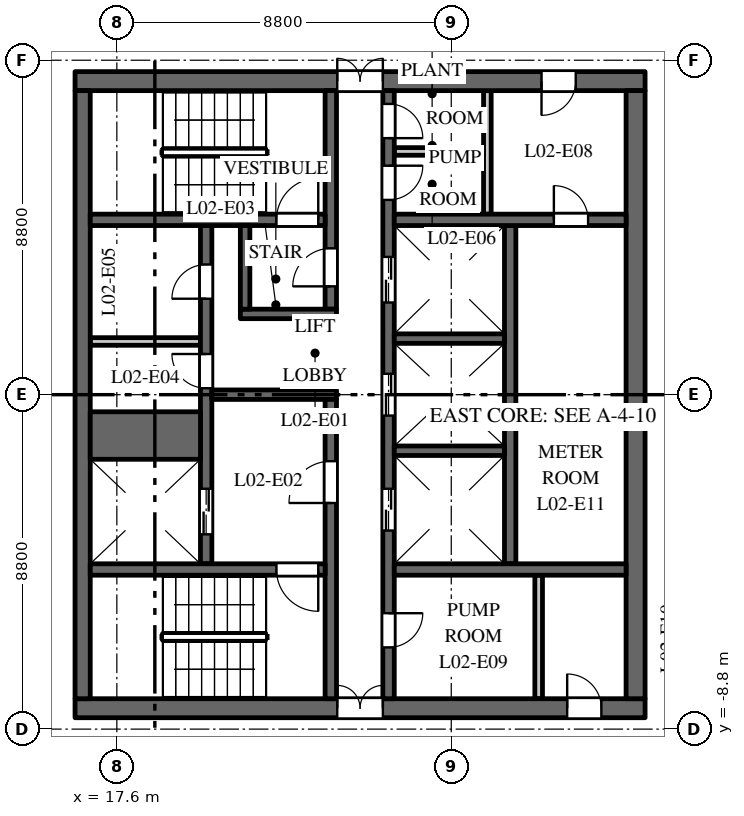
"""IFC4 building model, lengths in metres.
Left out: names, types, materials, properties, quantities, classifications, styles, units other than length and angle.
Written with IfcOpenShell. Run it as: python <this file> out.ifc"""

import sys

from ifc_helpers import new_model, si_unit, direction, frame, frame_2d, origin, place, context, subcontext, project, spatial, rectangle, extrude, element, fill, save


model = new_model("IFC4")
c1 = context("Model", 3, precision=1e-05, world=origin(), true_north=direction((0.0, 1.0)))
c2 = subcontext(c1, "Body", "Model", "MODEL_VIEW")
j1 = project(units=[si_unit("LENGTHUNIT", "METRE"), si_unit("PLANEANGLEUNIT", "RADIAN")], contexts=[c1])
p1 = place(None, origin())
s1 = spatial("IfcSite", under=j1, at=p1, CompositionType="ELEMENT")
p2 = place(p1, origin())
s2 = spatial("IfcBuilding", under=s1, at=p2, CompositionType="ELEMENT")
p3 = place(p2, frame((0.0, 0.0, 13.5)))
s3 = spatial("IfcBuildingStorey", under=s2, at=p3, CompositionType="ELEMENT", Elevation=13.5)
p4 = place(p3, frame((16.5, 8.25, 0.0), z_axis=(0.0, 0.0, 1.0), x_axis=(1.0, 0.0, 0.0)))
e1 = element("IfcWall", 1, at=p4, inside=s3, PredefinedType="SHEAR", context=c2, shape_type="SweptSolid", body=[
    extrude(rectangle(XDim=15.0, YDim=0.5, at=frame_2d((7.5, 0.0))), origin(), (0.0, 0.0, 1.0), 5.75),
])
p5 = place(p4, frame((6.9, 0.0, 0.0)))
e2 = element("IfcOpeningElement", 2, at=p5, cuts=e1, PredefinedType="OPENING", context=c2, shape_type="SweptSolid", body=[
    extrude(rectangle(XDim=1.2, YDim=2.1, at=frame_2d((0.6, 1.05))), frame((0.0, 0.26, 0.0), z_axis=(0.0, -1.0, 0.0), x_axis=(1.0, 0.0, 0.0)), (0.0, 0.0, 1.0), 0.52),
])
p6 = place(p4, frame((12.275, 0.0, 0.0)))
e3 = element("IfcOpeningElement", 3, at=p6, cuts=e1, PredefinedType="OPENING", context=c2, shape_type="SweptSolid", body=[
    extrude(rectangle(XDim=0.9, YDim=2.1, at=frame_2d((0.45, 1.05))), frame((0.0, 0.26, 0.0), z_axis=(0.0, -1.0, 0.0), x_axis=(1.0, 0.0, 0.0)), (0.0, 0.0, 1.0), 0.52),
])
p7 = place(p3, frame((16.5, -8.25, 0.0), z_axis=(0.0, 0.0, 1.0), x_axis=(1.0, 0.0, 0.0)))
e4 = element("IfcWall", 4, at=p7, inside=s3, PredefinedType="SHEAR", context=c2, shape_type="SweptSolid", body=[
    extrude(rectangle(XDim=15.0, YDim=0.5, at=frame_2d((7.5, 0.0))), origin(), (0.0, 0.0, 1.0), 5.75),
])
p8 = place(p7, frame((6.9, 0.0, 0.0)))
e5 = element("IfcOpeningElement", 5, at=p8, cuts=e4, PredefinedType="OPENING", context=c2, shape_type="SweptSolid", body=[
    extrude(rectangle(XDim=1.2, YDim=2.1, at=frame_2d((0.6, 1.05))), frame((0.0, 0.26, 0.0), z_axis=(0.0, -1.0, 0.0), x_axis=(1.0, 0.0, 0.0)), (0.0, 0.0, 1.0), 0.52),
])
p9 = place(p7, frame((12.95, 0.0, 0.0)))
e6 = element("IfcOpeningElement", 6, at=p9, cuts=e4, PredefinedType="OPENING", context=c2, shape_type="SweptSolid", body=[
    extrude(rectangle(XDim=0.9, YDim=2.1, at=frame_2d((0.45, 1.05))), frame((0.0, 0.26, 0.0), z_axis=(0.0, -1.0, 0.0), x_axis=(1.0, 0.0, 0.0)), (0.0, 0.0, 1.0), 0.52),
])
p10 = place(p3, frame((16.9, 1.4, 0.0), z_axis=(0.0, 0.0, 1.0), x_axis=(1.0, 0.0, 0.0)))
e7 = element("IfcWall", 7, at=p10, inside=s3, PredefinedType="PARTITIONING", context=c2, shape_type="SweptSolid", body=[
    extrude(rectangle(XDim=2.9, YDim=0.2, at=frame_2d((1.45, 0.0))), origin(), (0.0, 0.0, 1.0), 5.75),
])
p11 = place(p3, frame((27.95, -4.45, 0.0), z_axis=(0.0, 0.0, 1.0), x_axis=(0.0, 1.0, 0.0)))
e8 = element("IfcWall", 8, at=p11, inside=s3, PredefinedType="SHEAR", context=c2, shape_type="SweptSolid", body=[
    extrude(rectangle(XDim=8.9, YDim=0.3, at=frame_2d((4.45, 0.0))), origin(), (0.0, 0.0, 1.0), 5.75),
])
p12 = place(p3, frame((19.95, -4.45, 0.0), z_axis=(0.0, 0.0, 1.0), x_axis=(0.0, 1.0, 0.0)))
e9 = element("IfcWall", 9, at=p12, inside=s3, PredefinedType="SHEAR", context=c2, shape_type="SweptSolid", body=[
    extrude(rectangle(XDim=8.9, YDim=0.3, at=frame_2d((4.45, 0.0))), origin(), (0.0, 0.0, 1.0), 5.75),
])
p13 = place(p12, frame((0.775, 0.0, 0.0)))
e10 = element("IfcOpeningElement", 10, at=p13, cuts=e9, PredefinedType="OPENING", context=c2, shape_type="SweptSolid", body=[
    extrude(rectangle(XDim=1.2, YDim=2.1, at=frame_2d((0.6, 1.05))), frame((0.0, 0.16, 0.0), z_axis=(0.0, -1.0, 0.0), x_axis=(1.0, 0.0, 0.0)), (0.0, 0.0, 1.0), 0.32),
])
p14 = place(p12, frame((4.62, 0.0, 0.0)))
e11 = element("IfcOpeningElement", 11, at=p14, cuts=e9, PredefinedType="OPENING", context=c2, shape_type="SweptSolid", body=[
    extrude(rectangle(XDim=0.9, YDim=2.1, at=frame_2d((0.45, 1.05))), frame((0.0, 0.16, 0.0), z_axis=(0.0, -1.0, 0.0), x_axis=(1.0, 0.0, 0.0)), (0.0, 0.0, 1.0), 0.32),
])
p15 = place(p12, frame((6.975, 0.0, 0.0)))
e12 = element("IfcOpeningElement", 12, at=p15, cuts=e9, PredefinedType="OPENING", context=c2, shape_type="SweptSolid", body=[
    extrude(rectangle(XDim=0.9, YDim=2.1, at=frame_2d((0.45, 1.05))), frame((0.0, 0.16, 0.0), z_axis=(0.0, -1.0, 0.0), x_axis=(1.0, 0.0, 0.0)), (0.0, 0.0, 1.0), 0.32),
])
p16 = place(p3, frame((24.75, -8.0, 0.0), z_axis=(0.0, 0.0, 1.0), x_axis=(0.0, 1.0, 0.0)))
e13 = element("IfcWall", 13, at=p16, inside=s3, PredefinedType="SHEAR", context=c2, shape_type="SweptSolid", body=[
    extrude(rectangle(XDim=16.0, YDim=0.3, at=frame_2d((8.0, 0.0))), origin(), (0.0, 0.0, 1.0), 5.75),
])
p17 = place(p16, frame((4.425, 0.0, 0.0)))
e14 = element("IfcOpeningElement", 14, at=p17, cuts=e13, PredefinedType="OPENING", context=c2, shape_type="SweptSolid", body=[
    extrude(rectangle(XDim=1.1, YDim=2.1, at=frame_2d((0.55, 1.05))), frame((0.0, 0.16, 0.0), z_axis=(0.0, -1.0, 0.0), x_axis=(1.0, 0.0, 0.0)), (0.0, 0.0, 1.0), 0.32),
])
p18 = place(p16, frame((7.45, 0.0, 0.0)))
e15 = element("IfcOpeningElement", 15, at=p18, cuts=e13, PredefinedType="OPENING", context=c2, shape_type="SweptSolid", body=[
    extrude(rectangle(XDim=1.1, YDim=2.1, at=frame_2d((0.55, 1.05))), frame((0.0, 0.16, 0.0), z_axis=(0.0, -1.0, 0.0), x_axis=(1.0, 0.0, 0.0)), (0.0, 0.0, 1.0), 0.32),
])
p19 = place(p16, frame((10.425, 0.0, 0.0)))
e16 = element("IfcOpeningElement", 16, at=p19, cuts=e13, PredefinedType="OPENING", context=c2, shape_type="SweptSolid", body=[
    extrude(rectangle(XDim=1.2, YDim=2.1, at=frame_2d((0.6, 1.05))), frame((0.0, 0.16, 0.0), z_axis=(0.0, -1.0, 0.0), x_axis=(1.0, 0.0, 0.0)), (0.0, 0.0, 1.0), 0.32),
])
p20 = place(p16, frame((13.125, 0.0, 0.0)))
e17 = element("IfcOpeningElement", 17, at=p20, cuts=e13, PredefinedType="OPENING", context=c2, shape_type="SweptSolid", body=[
    extrude(rectangle(XDim=0.9, YDim=2.1, at=frame_2d((0.45, 1.05))), frame((0.0, 0.16, 0.0), z_axis=(0.0, -1.0, 0.0), x_axis=(1.0, 0.0, 0.0)), (0.0, 0.0, 1.0), 0.32),
])
p21 = place(p16, frame((14.75, 0.0, 0.0)))
e18 = element("IfcOpeningElement", 18, at=p21, cuts=e13, PredefinedType="OPENING", context=c2, shape_type="SweptSolid", body=[
    extrude(rectangle(XDim=0.9, YDim=2.1, at=frame_2d((0.45, 1.05))), frame((0.0, 0.16, 0.0), z_axis=(0.0, -1.0, 0.0), x_axis=(1.0, 0.0, 0.0)), (0.0, 0.0, 1.0), 0.32),
])
p22 = place(p16, frame((1.35, 0.0, 0.0)))
e19 = element("IfcOpeningElement", 19, at=p22, cuts=e13, PredefinedType="OPENING", context=c2, shape_type="SweptSolid", body=[
    extrude(rectangle(XDim=0.9, YDim=2.1, at=frame_2d((0.45, 1.05))), frame((0.0, 0.16, 0.0), z_axis=(0.0, -1.0, 0.0), x_axis=(1.0, 0.0, 0.0)), (0.0, 0.0, 1.0), 0.32),
])
p23 = place(p3, frame((20.1, 0.0, 0.0), z_axis=(0.0, 0.0, 1.0), x_axis=(1.0, 0.0, 0.0)))
e20 = element("IfcWall", 20, at=p23, inside=s3, PredefinedType="SHEAR", context=c2, shape_type="SweptSolid", body=[
    extrude(rectangle(XDim=3.28, YDim=0.25, at=frame_2d((1.64, 0.0))), origin(), (0.0, 0.0, 1.0), 5.75),
])
p24 = place(p3, frame((16.7, -8.0, 0.0), z_axis=(0.0, 0.0, 1.0), x_axis=(0.0, 1.0, 0.0)))
e21 = element("IfcWall", 21, at=p24, inside=s3, PredefinedType="SHEAR", context=c2, shape_type="SweptSolid", body=[
    extrude(rectangle(XDim=16.0, YDim=0.4, at=frame_2d((8.0, 0.0))), origin(), (0.0, 0.0, 1.0), 5.75),
])
p25 = place(p3, frame((31.25, -8.0, 0.0), z_axis=(0.0, 0.0, 1.0), x_axis=(0.0, 1.0, 0.0)))
e22 = element("IfcWall", 22, at=p25, inside=s3, PredefinedType="SHEAR", context=c2, shape_type="SweptSolid", body=[
    extrude(rectangle(XDim=16.0, YDim=0.5, at=frame_2d((8.0, 0.0))), origin(), (0.0, 0.0, 1.0), 5.75),
])
p26 = place(p3, frame((24.9, 4.6, 0.0), z_axis=(0.0, 0.0, 1.0), x_axis=(1.0, 0.0, 0.0)))
e23 = element("IfcWall", 23, at=p26, inside=s3, PredefinedType="SHEAR", context=c2, shape_type="SweptSolid", body=[
    extrude(rectangle(XDim=6.1, YDim=0.3, at=frame_2d((3.05, 0.0))), origin(), (0.0, 0.0, 1.0), 5.75),
])
p27 = place(p26, frame((4.2, 0.0, 0.0)))
e24 = element("IfcOpeningElement", 24, at=p27, cuts=e23, PredefinedType="OPENING", context=c2, shape_type="SweptSolid", body=[
    extrude(rectangle(XDim=0.9, YDim=2.1, at=frame_2d((0.45, 1.05))), frame((0.0, 0.16, 0.0), z_axis=(0.0, -1.0, 0.0), x_axis=(1.0, 0.0, 0.0)), (0.0, 0.0, 1.0), 0.32),
])
for number, where, z_axis, x_axis in (
    (25, (27.35, 4.75, 0.0), (0.0, 0.0, 1.0), (0.0, 1.0, 0.0)),
    (26, (28.7, -8.0, 0.0), (0.0, 0.0, 1.0), (0.0, 1.0, 0.0)),
):
    element("IfcWall", number, at=place(p3, frame(where, z_axis=z_axis, x_axis=x_axis)), inside=s3, PredefinedType="PARTITIONING", context=c2, shape_type="SweptSolid", body=[
        extrude(rectangle(XDim=3.25, YDim=0.2, at=frame_2d((1.625, 0.0))), origin(), (0.0, 0.0, 1.0), 5.75),
    ])
p28 = place(p3, frame((24.9, 6.4, 0.0), z_axis=(0.0, 0.0, 1.0), x_axis=(1.0, 0.0, 0.0)))
e27 = element("IfcWall", 27, at=p28, inside=s3, PredefinedType="PARTITIONING", context=c2, shape_type="SweptSolid", body=[
    extrude(rectangle(XDim=2.35, YDim=0.2, at=frame_2d((1.175, 0.0))), origin(), (0.0, 0.0, 1.0), 5.75),
])
p29 = place(p3, frame((24.9, -4.6, 0.0), z_axis=(0.0, 0.0, 1.0), x_axis=(1.0, 0.0, 0.0)))
e28 = element("IfcWall", 28, at=p29, inside=s3, PredefinedType="SHEAR", context=c2, shape_type="SweptSolid", body=[
    extrude(rectangle(XDim=6.1, YDim=0.3, at=frame_2d((3.05, 0.0))), origin(), (0.0, 0.0, 1.0), 5.75),
])
p30 = place(p3, frame((16.9, -1.075, 0.0), z_axis=(0.0, 0.0, 1.0), x_axis=(1.0, 0.0, 0.0)))
e29 = element("IfcWall", 29, at=p30, inside=s3, PredefinedType="SHEAR", context=c2, shape_type="SweptSolid", body=[
    extrude(rectangle(XDim=2.9, YDim=1.25, at=frame_2d((1.45, 0.0))), origin(), (0.0, 0.0, 1.0), 5.75),
])
for number, where, z_axis, x_axis in (
    (30, (24.9, -1.475, 0.0), (0.0, 0.0, 1.0), (1.0, 0.0, 0.0)),
    (31, (24.9, 1.475, 0.0), (0.0, 0.0, 1.0), (1.0, 0.0, 0.0)),
):
    element("IfcWall", number, at=place(p3, frame(where, z_axis=z_axis, x_axis=x_axis)), inside=s3, PredefinedType="SHEAR", context=c2, shape_type="SweptSolid", body=[
        extrude(rectangle(XDim=2.9, YDim=0.25, at=frame_2d((1.45, 0.0))), origin(), (0.0, 0.0, 1.0), 5.75),
    ])
p31 = place(p3, frame((23.23, 2.25, 0.0), z_axis=(0.0, 0.0, 1.0), x_axis=(0.0, 1.0, 0.0)))
e32 = element("IfcWall", 32, at=p31, inside=s3, PredefinedType="SHEAR", context=c2, shape_type="SweptSolid", body=[
    extrude(rectangle(XDim=5.75, YDim=0.3, at=frame_2d((2.875, 0.0))), origin(), (0.0, 0.0, 1.0), 5.75),
])
p32 = place(p31, frame((0.6, 0.0, 0.0)))
e33 = element("IfcOpeningElement", 33, at=p32, cuts=e32, PredefinedType="OPENING", context=c2, shape_type="SweptSolid", body=[
    extrude(rectangle(XDim=1.0, YDim=2.1, at=frame_2d((0.5, 1.05))), frame((0.0, 0.16, 0.0), z_axis=(0.0, -1.0, 0.0), x_axis=(1.0, 0.0, 0.0)), (0.0, 0.0, 1.0), 0.32),
])
p33 = place(p3, frame((23.23, -8.0, 0.0), z_axis=(0.0, 0.0, 1.0), x_axis=(0.0, 1.0, 0.0)))
e34 = element("IfcWall", 34, at=p33, inside=s3, PredefinedType="SHEAR", context=c2, shape_type="SweptSolid", body=[
    extrude(rectangle(XDim=7.875, YDim=0.3, at=frame_2d((3.938, 0.0))), origin(), (0.0, 0.0, 1.0), 5.75),
])
p34 = place(p33, frame((5.15, 0.0, 0.0)))
e35 = element("IfcOpeningElement", 35, at=p34, cuts=e34, PredefinedType="OPENING", context=c2, shape_type="SweptSolid", body=[
    extrude(rectangle(XDim=1.1, YDim=2.1, at=frame_2d((0.55, 1.05))), frame((0.0, 0.16, 0.0), z_axis=(0.0, -1.0, 0.0), x_axis=(1.0, 0.0, 0.0)), (0.0, 0.0, 1.0), 0.32),
])
p35 = place(p3, frame((16.9, 4.6, 0.0), z_axis=(0.0, 0.0, 1.0), x_axis=(1.0, 0.0, 0.0)))
e36 = element("IfcWall", 36, at=p35, inside=s3, PredefinedType="SHEAR", context=c2, shape_type="SweptSolid", body=[
    extrude(rectangle(XDim=6.18, YDim=0.3, at=frame_2d((3.09, 0.0))), origin(), (0.0, 0.0, 1.0), 5.75),
])
p36 = place(p35, frame((4.9, 0.0, 0.0)))
e37 = element("IfcOpeningElement", 37, at=p36, cuts=e36, PredefinedType="OPENING", context=c2, shape_type="SweptSolid", body=[
    extrude(rectangle(XDim=1.1, YDim=2.1, at=frame_2d((0.55, 1.05))), frame((0.0, 0.16, 0.0), z_axis=(0.0, -1.0, 0.0), x_axis=(1.0, 0.0, 0.0)), (0.0, 0.0, 1.0), 0.32),
])
p37 = place(p3, frame((16.9, -4.6, 0.0), z_axis=(0.0, 0.0, 1.0), x_axis=(1.0, 0.0, 0.0)))
e38 = element("IfcWall", 38, at=p37, inside=s3, PredefinedType="SHEAR", context=c2, shape_type="SweptSolid", body=[
    extrude(rectangle(XDim=6.18, YDim=0.3, at=frame_2d((3.09, 0.0))), origin(), (0.0, 0.0, 1.0), 5.75),
])
p38 = place(p37, frame((4.9, 0.0, 0.0)))
e39 = element("IfcOpeningElement", 39, at=p38, cuts=e38, PredefinedType="OPENING", context=c2, shape_type="SweptSolid", body=[
    extrude(rectangle(XDim=1.1, YDim=2.1, at=frame_2d((0.55, 1.05))), frame((0.0, 0.16, 0.0), z_axis=(0.0, -1.0, 0.0), x_axis=(1.0, 0.0, 0.0)), (0.0, 0.0, 1.0), 0.32),
])
p39 = place(p3, frame((20.85, 2.125, 0.0), z_axis=(0.0, 0.0, 1.0), x_axis=(1.0, 0.0, 0.0)))
e40 = element("IfcWall", 40, at=p39, inside=s3, PredefinedType="SHEAR", context=c2, shape_type="SweptSolid", body=[
    extrude(rectangle(XDim=2.53, YDim=0.25, at=frame_2d((1.265, 0.0))), origin(), (0.0, 0.0, 1.0), 5.75),
])
p40 = place(p3, frame((20.975, 2.25, 0.0), z_axis=(0.0, 0.0, 1.0), x_axis=(0.0, 1.0, 0.0)))
e41 = element("IfcWall", 41, at=p40, inside=s3, PredefinedType="SHEAR", context=c2, shape_type="SweptSolid", body=[
    extrude(rectangle(XDim=2.2, YDim=0.25, at=frame_2d((1.1, 0.0))), origin(), (0.0, 0.0, 1.0), 5.75),
])
p41 = place(p13, origin())
e42 = element("IfcDoor", 42, at=p41, inside=s3, OperationType="DOUBLE_DOOR_SLIDING", PredefinedType="DOOR", context=c2, shape_type="SweptSolid", body=[
    extrude(rectangle(XDim=1.2, YDim=2.1, at=frame_2d((0.6, 1.05))), frame((0.0, 0.025, 0.0), z_axis=(0.0, -1.0, 0.0), x_axis=(1.0, 0.0, 0.0)), (0.0, 0.0, 1.0), 0.05),
])
fill(e10, e42)
p42 = place(p17, origin())
e43 = element("IfcDoor", 43, at=p42, inside=s3, OperationType="DOUBLE_DOOR_SLIDING", PredefinedType="DOOR", context=c2, shape_type="SweptSolid", body=[
    extrude(rectangle(XDim=1.1, YDim=2.1, at=frame_2d((0.55, 1.05))), frame((0.0, 0.025, 0.0), z_axis=(0.0, -1.0, 0.0), x_axis=(1.0, 0.0, 0.0)), (0.0, 0.0, 1.0), 0.05),
])
fill(e14, e43)
p43 = place(p18, origin())
e44 = element("IfcDoor", 44, at=p43, inside=s3, OperationType="DOUBLE_DOOR_SLIDING", PredefinedType="DOOR", context=c2, shape_type="SweptSolid", body=[
    extrude(rectangle(XDim=1.1, YDim=2.1, at=frame_2d((0.55, 1.05))), frame((0.0, 0.025, 0.0), z_axis=(0.0, -1.0, 0.0), x_axis=(1.0, 0.0, 0.0)), (0.0, 0.0, 1.0), 0.05),
])
fill(e15, e44)
p44 = place(p19, origin())
e45 = element("IfcDoor", 45, at=p44, inside=s3, OperationType="DOUBLE_DOOR_SLIDING", PredefinedType="DOOR", context=c2, shape_type="SweptSolid", body=[
    extrude(rectangle(XDim=1.2, YDim=2.1, at=frame_2d((0.6, 1.05))), frame((0.0, 0.025, 0.0), z_axis=(0.0, -1.0, 0.0), x_axis=(1.0, 0.0, 0.0)), (0.0, 0.0, 1.0), 0.05),
])
fill(e16, e45)
p45 = place(p36, origin())
e46 = element("IfcDoor", 46, at=p45, inside=s3, OperationType="SINGLE_SWING_LEFT", PredefinedType="DOOR", context=c2, shape_type="SweptSolid", body=[
    extrude(rectangle(XDim=1.1, YDim=2.1, at=frame_2d((0.55, 1.05))), frame((0.0, 0.025, 0.0), z_axis=(0.0, -1.0, 0.0), x_axis=(1.0, 0.0, 0.0)), (0.0, 0.0, 1.0), 0.05),
])
fill(e37, e46)
p46 = place(p38, origin())
e47 = element("IfcDoor", 47, at=p46, inside=s3, OperationType="SINGLE_SWING_RIGHT", PredefinedType="DOOR", context=c2, shape_type="SweptSolid", body=[
    extrude(rectangle(XDim=1.1, YDim=2.1, at=frame_2d((0.55, 1.05))), frame((0.0, 0.025, 0.0), z_axis=(0.0, -1.0, 0.0), x_axis=(1.0, 0.0, 0.0)), (0.0, 0.0, 1.0), 0.05),
])
fill(e39, e47)
p47 = place(p34, origin())
e48 = element("IfcDoor", 48, at=p47, inside=s3, OperationType="SINGLE_SWING_RIGHT", PredefinedType="DOOR", context=c2, shape_type="SweptSolid", body=[
    extrude(rectangle(XDim=1.1, YDim=2.1, at=frame_2d((0.55, 1.05))), frame((0.0, 0.025, 0.0), z_axis=(0.0, -1.0, 0.0), x_axis=(1.0, 0.0, 0.0)), (0.0, 0.0, 1.0), 0.05),
])
fill(e35, e48)
p48 = place(p32, origin())
e49 = element("IfcDoor", 49, at=p48, inside=s3, OperationType="SINGLE_SWING_RIGHT", PredefinedType="DOOR", context=c2, shape_type="SweptSolid", body=[
    extrude(rectangle(XDim=1.0, YDim=2.1, at=frame_2d((0.5, 1.05))), frame((0.0, 0.025, 0.0), z_axis=(0.0, -1.0, 0.0), x_axis=(1.0, 0.0, 0.0)), (0.0, 0.0, 1.0), 0.05),
])
fill(e33, e49)
p49 = place(p5, origin())
e50 = element("IfcDoor", 50, at=p49, inside=s3, OperationType="DOUBLE_DOOR_DOUBLE_SWING", PredefinedType="DOOR", context=c2, shape_type="SweptSolid", body=[
    extrude(rectangle(XDim=1.2, YDim=2.1, at=frame_2d((0.6, 1.05))), frame((0.0, 0.025, 0.0), z_axis=(0.0, -1.0, 0.0), x_axis=(1.0, 0.0, 0.0)), (0.0, 0.0, 1.0), 0.05),
])
fill(e2, e50)
p50 = place(p8, origin())
e51 = element("IfcDoor", 51, at=p50, inside=s3, OperationType="DOUBLE_DOOR_DOUBLE_SWING", PredefinedType="DOOR", context=c2, shape_type="SweptSolid", body=[
    extrude(rectangle(XDim=1.2, YDim=2.1, at=frame_2d((0.6, 1.05))), frame((0.0, 0.025, 0.0), z_axis=(0.0, -1.0, 0.0), x_axis=(1.0, 0.0, 0.0)), (0.0, 0.0, 1.0), 0.05),
])
fill(e5, e51)
p51 = place(p14, origin())
e52 = element("IfcDoor", 52, at=p51, inside=s3, OperationType="SINGLE_SWING_LEFT", PredefinedType="DOOR", context=c2, shape_type="SweptSolid", body=[
    extrude(rectangle(XDim=0.9, YDim=2.1, at=frame_2d((0.45, 1.05))), frame((0.0, 0.025, 0.0), z_axis=(0.0, -1.0, 0.0), x_axis=(1.0, 0.0, 0.0)), (0.0, 0.0, 1.0), 0.05),
])
fill(e11, e52)
p52 = place(p15, origin())
e53 = element("IfcDoor", 53, at=p52, inside=s3, OperationType="SINGLE_SWING_RIGHT", PredefinedType="DOOR", context=c2, shape_type="SweptSolid", body=[
    extrude(rectangle(XDim=0.9, YDim=2.1, at=frame_2d((0.45, 1.05))), frame((0.0, 0.025, 0.0), z_axis=(0.0, -1.0, 0.0), x_axis=(1.0, 0.0, 0.0)), (0.0, 0.0, 1.0), 0.05),
])
fill(e12, e53)
p53 = place(p20, origin())
e54 = element("IfcDoor", 54, at=p53, inside=s3, OperationType="SINGLE_SWING_RIGHT", PredefinedType="DOOR", context=c2, shape_type="SweptSolid", body=[
    extrude(rectangle(XDim=0.9, YDim=2.1, at=frame_2d((0.45, 1.05))), frame((0.0, 0.025, 0.0), z_axis=(0.0, -1.0, 0.0), x_axis=(1.0, 0.0, 0.0)), (0.0, 0.0, 1.0), 0.05),
])
fill(e17, e54)
p54 = place(p21, origin())
e55 = element("IfcDoor", 55, at=p54, inside=s3, OperationType="SINGLE_SWING_LEFT", PredefinedType="DOOR", context=c2, shape_type="SweptSolid", body=[
    extrude(rectangle(XDim=0.9, YDim=2.1, at=frame_2d((0.45, 1.05))), frame((0.0, 0.025, 0.0), z_axis=(0.0, -1.0, 0.0), x_axis=(1.0, 0.0, 0.0)), (0.0, 0.0, 1.0), 0.05),
])
fill(e18, e55)
p55 = place(p6, origin())
e56 = element("IfcDoor", 56, at=p55, inside=s3, OperationType="SINGLE_SWING_LEFT", PredefinedType="DOOR", context=c2, shape_type="SweptSolid", body=[
    extrude(rectangle(XDim=0.9, YDim=2.1, at=frame_2d((0.45, 1.05))), frame((0.0, 0.025, 0.0), z_axis=(0.0, -1.0, 0.0), x_axis=(1.0, 0.0, 0.0)), (0.0, 0.0, 1.0), 0.05),
])
fill(e3, e56)
p56 = place(p22, origin())
e57 = element("IfcDoor", 57, at=p56, inside=s3, OperationType="SINGLE_SWING_RIGHT", PredefinedType="DOOR", context=c2, shape_type="SweptSolid", body=[
    extrude(rectangle(XDim=0.9, YDim=2.1, at=frame_2d((0.45, 1.05))), frame((0.0, 0.025, 0.0), z_axis=(0.0, -1.0, 0.0), x_axis=(1.0, 0.0, 0.0)), (0.0, 0.0, 1.0), 0.05),
])
fill(e19, e57)
p57 = place(p9, origin())
e58 = element("IfcDoor", 58, at=p57, inside=s3, OperationType="SINGLE_SWING_RIGHT", PredefinedType="DOOR", context=c2, shape_type="SweptSolid", body=[
    extrude(rectangle(XDim=0.9, YDim=2.1, at=frame_2d((0.45, 1.05))), frame((0.0, 0.025, 0.0), z_axis=(0.0, -1.0, 0.0), x_axis=(1.0, 0.0, 0.0)), (0.0, 0.0, 1.0), 0.05),
])
fill(e6, e58)
p58 = place(p27, origin())
e59 = element("IfcDoor", 59, at=p58, inside=s3, OperationType="SINGLE_SWING_RIGHT", PredefinedType="DOOR", context=c2, shape_type="SweptSolid", body=[
    extrude(rectangle(XDim=0.9, YDim=2.1, at=frame_2d((0.45, 1.05))), frame((0.0, 0.025, 0.0), z_axis=(0.0, -1.0, 0.0), x_axis=(1.0, 0.0, 0.0)), (0.0, 0.0, 1.0), 0.05),
])
fill(e24, e59)
save(model, sys.argv[1])
